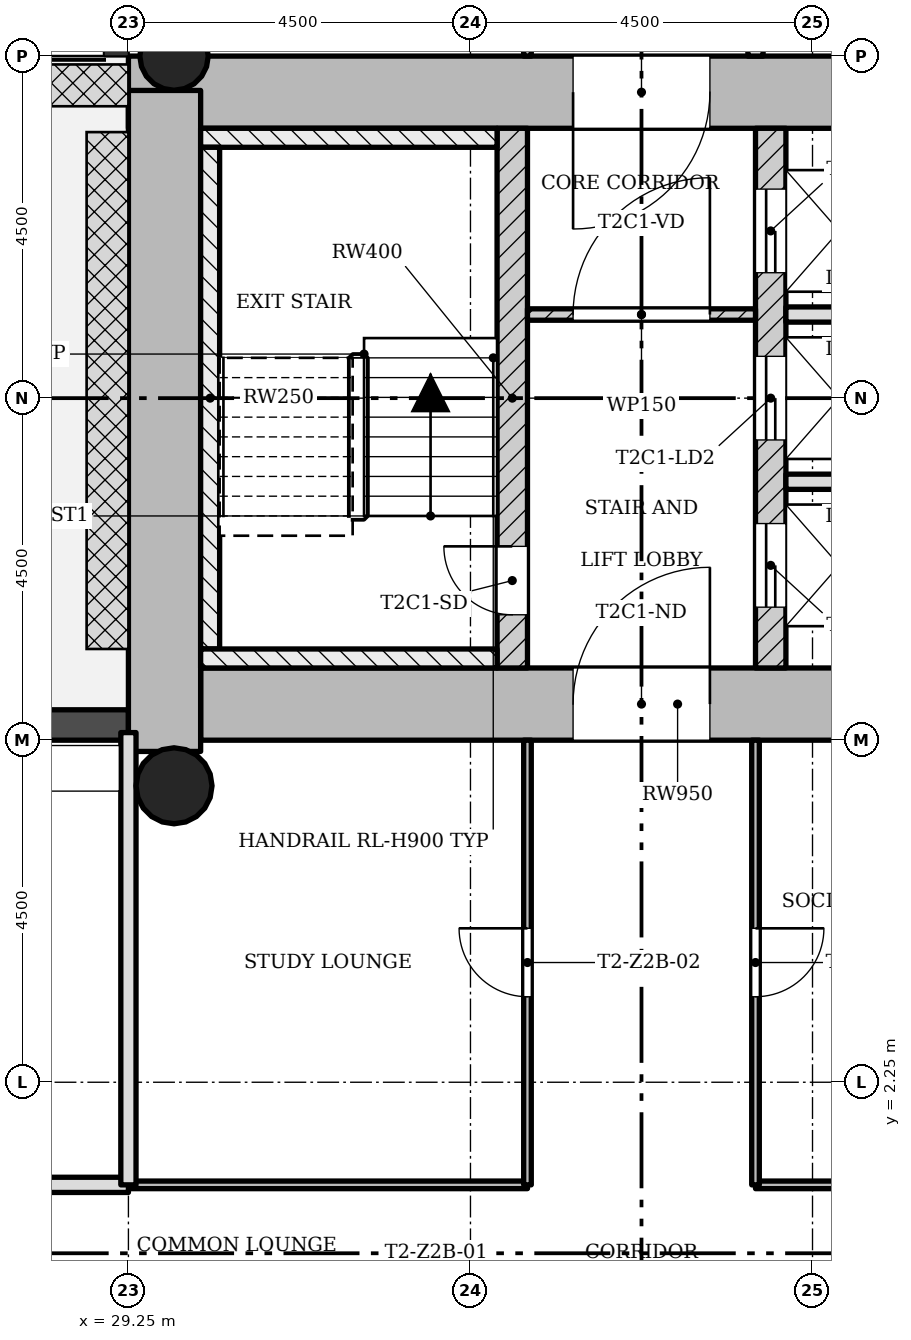
"""IFC4 building model, lengths in metres.
Left out: names, types, materials, properties, quantities, classifications, styles, units other than length and angle.
Written with IfcOpenShell. Run it as: python <this file> out.ifc"""

import sys

from ifc_helpers import new_model, si_unit, direction, frame, frame_2d, origin, origin_2d, place, context, subcontext, project, spatial, rectangle, hollow_circle, extrude, element, fill, save


model = new_model("IFC4")
c1 = context("Model", 3, precision=1e-05, world=origin(), true_north=direction((0.0, 1.0)))
c2 = subcontext(c1, "Body", "Model", "MODEL_VIEW")
j1 = project(units=[si_unit("LENGTHUNIT", "METRE"), si_unit("PLANEANGLEUNIT", "RADIAN")], contexts=[c1])
p1 = place(None, origin())
s1 = spatial("IfcSite", under=j1, at=p1, CompositionType="ELEMENT")
p2 = place(p1, origin())
s2 = spatial("IfcBuilding", under=s1, at=p2, CompositionType="ELEMENT")
p3 = place(p2, frame((0.0, 0.0, 76.6)))
s3 = spatial("IfcBuildingStorey", under=s2, at=p3, CompositionType="ELEMENT", Elevation=76.6)
p4 = place(p3, frame((30.2, 7.225, 0.0), z_axis=(0.0, 0.0, 1.0), x_axis=(1.0, 0.0, 0.0)))
e1 = element("IfcWall", 1, at=p4, inside=s3, PredefinedType="SHEAR", context=c2, shape_type="SweptSolid", body=[
    extrude(rectangle(XDim=12.55, YDim=0.95, at=frame_2d((6.275, 0.0))), origin(), (0.0, 0.0, 1.0), 3.4),
])
p5 = place(p4, frame((4.9, 0.0, 0.0)))
e2 = element("IfcOpeningElement", 2, at=p5, cuts=e1, PredefinedType="OPENING", context=c2, shape_type="SweptSolid", body=[
    extrude(rectangle(XDim=1.8, YDim=2.1, at=frame_2d((0.9, 1.05))), frame((0.0, 0.485, 0.0), z_axis=(0.0, -1.0, 0.0), x_axis=(1.0, 0.0, 0.0)), (0.0, 0.0, 1.0), 0.97),
])
p6 = place(p3, frame((41.8, 15.275, 0.0), z_axis=(0.0, 0.0, 1.0), x_axis=(-1.0, 0.0, 0.0)))
e3 = element("IfcWall", 3, at=p6, inside=s3, PredefinedType="SHEAR", context=c2, shape_type="SweptSolid", body=[
    extrude(rectangle(XDim=12.55, YDim=0.95, at=frame_2d((6.275, 0.0))), origin(), (0.0, 0.0, 1.0), 3.4),
])
p7 = place(p6, frame((4.9, 0.0, 0.0)))
e4 = element("IfcOpeningElement", 4, at=p7, cuts=e3, PredefinedType="OPENING", context=c2, shape_type="SweptSolid", body=[
    extrude(rectangle(XDim=1.8, YDim=2.1, at=frame_2d((0.9, 1.05))), frame((0.0, 0.485, 0.0), z_axis=(0.0, -1.0, 0.0), x_axis=(1.0, 0.0, 0.0)), (0.0, 0.0, 1.0), 0.97),
])
p8 = place(p3, frame((29.725, 15.298, 0.0), z_axis=(0.0, 0.0, 1.0), x_axis=(0.0, -1.0, 0.0)))
e5 = element("IfcWall", 5, at=p8, inside=s3, PredefinedType="SHEAR", context=c2, shape_type="SweptSolid", body=[
    extrude(rectangle(XDim=8.696, YDim=0.95, at=frame_2d((4.348, 0.0))), origin(), (0.0, 0.0, 1.0), 3.4),
])
p9 = place(p3, frame((34.3, 7.7, 0.0), z_axis=(0.0, 0.0, 1.0), x_axis=(0.0, 1.0, 0.0)))
e6 = element("IfcWall", 6, at=p9, inside=s3, PredefinedType="SHEAR", context=c2, shape_type="SweptSolid", body=[
    extrude(rectangle(XDim=7.1, YDim=0.4, at=frame_2d((3.55, 0.0))), origin(), (0.0, 0.0, 1.0), 3.4),
])
p10 = place(p9, frame((0.7, 0.0, 0.0)))
e7 = element("IfcOpeningElement", 7, at=p10, cuts=e6, PredefinedType="OPENING", context=c2, shape_type="SweptSolid", body=[
    extrude(rectangle(XDim=0.9, YDim=2.1, at=frame_2d((0.45, 1.05))), frame((0.0, 0.21, 0.0), z_axis=(0.0, -1.0, 0.0), x_axis=(1.0, 0.0, 0.0)), (0.0, 0.0, 1.0), 0.42),
])
p11 = place(p3, frame((37.7, 7.7, 0.0), z_axis=(0.0, 0.0, 1.0), x_axis=(0.0, 1.0, 0.0)))
e8 = element("IfcWall", 8, at=p11, inside=s3, PredefinedType="SHEAR", context=c2, shape_type="SweptSolid", body=[
    extrude(rectangle(XDim=7.1, YDim=0.4, at=frame_2d((3.55, 0.0))), origin(), (0.0, 0.0, 1.0), 3.4),
])
p12 = place(p11, frame((0.8, 0.0, 0.0)))
e9 = element("IfcOpeningElement", 9, at=p12, cuts=e8, PredefinedType="OPENING", context=c2, shape_type="SweptSolid", body=[
    extrude(rectangle(XDim=1.1, YDim=2.1, at=frame_2d((0.55, 1.05))), frame((0.0, 0.21, 0.0), z_axis=(0.0, -1.0, 0.0), x_axis=(1.0, 0.0, 0.0)), (0.0, 0.0, 1.0), 0.42),
])
p13 = place(p11, frame((3.0, 0.0, 0.0)))
e10 = element("IfcOpeningElement", 10, at=p13, cuts=e8, PredefinedType="OPENING", context=c2, shape_type="SweptSolid", body=[
    extrude(rectangle(XDim=1.1, YDim=2.1, at=frame_2d((0.55, 1.05))), frame((0.0, 0.21, 0.0), z_axis=(0.0, -1.0, 0.0), x_axis=(1.0, 0.0, 0.0)), (0.0, 0.0, 1.0), 0.42),
])
p14 = place(p11, frame((5.2, 0.0, 0.0)))
e11 = element("IfcOpeningElement", 11, at=p14, cuts=e8, PredefinedType="OPENING", context=c2, shape_type="SweptSolid", body=[
    extrude(rectangle(XDim=1.1, YDim=2.1, at=frame_2d((0.55, 1.05))), frame((0.0, 0.21, 0.0), z_axis=(0.0, -1.0, 0.0), x_axis=(1.0, 0.0, 0.0)), (0.0, 0.0, 1.0), 0.42),
])
p15 = place(p3, frame((29.85, 15.75, 0.0), z_axis=(0.0, 0.0, 1.0), x_axis=(1.0, 0.0, 0.0)))
e12 = element("IfcColumn", 12, at=p15, inside=s3, PredefinedType="COLUMN", context=c2, shape_type="SweptSolid", body=[
    extrude(hollow_circle(Radius=0.45, WallThickness=0.032, at=origin_2d()), origin(), (0.0, 0.0, 1.0), 3.4),
])
p16 = place(p3, frame((29.85, 6.15, 0.0), z_axis=(0.0, 0.0, 1.0), x_axis=(1.0, 0.0, 0.0)))
e13 = element("IfcColumn", 13, at=p16, inside=s3, PredefinedType="COLUMN", context=c2, shape_type="SweptSolid", body=[
    extrude(hollow_circle(Radius=0.5, WallThickness=0.036, at=origin_2d()), origin(), (0.0, 0.0, 1.0), 3.4),
])
p17 = place(p3, frame((29.25, 6.95, -0.02), z_axis=(0.0, 0.0, 1.0), x_axis=(-1.0, 0.0, 0.0)))
e14 = element("IfcWall", 14, at=p17, inside=s3, PredefinedType="STANDARD", context=c2, shape_type="SweptSolid", body=[
    extrude(rectangle(XDim=4.5, YDim=0.4, at=frame_2d((2.25, 0.0))), origin(), (0.0, 0.0, 1.0), 3.12),
])
p18 = place(p17, frame((1.35, 0.0, 0.02)))
e15 = element("IfcOpeningElement", 15, at=p18, cuts=e14, PredefinedType="OPENING", context=c2, shape_type="SweptSolid", body=[
    extrude(rectangle(XDim=1.8, YDim=2.1, at=frame_2d((0.9, 1.05))), frame((0.0, 0.21, 0.0), z_axis=(0.0, -1.0, 0.0), x_axis=(1.0, 0.0, 0.0)), (0.0, 0.0, 1.0), 0.42),
])
p19 = place(p3, frame((37.5, 12.35, 0.0), z_axis=(0.0, 0.0, 1.0), x_axis=(-1.0, 0.0, 0.0)))
e16 = element("IfcWall", 16, at=p19, inside=s3, PredefinedType="PARTITIONING", context=c2, shape_type="SweptSolid", body=[
    extrude(rectangle(XDim=3.0, YDim=0.15, at=frame_2d((1.5, 0.0))), origin(), (0.0, 0.0, 1.0), 3.0),
])
p20 = place(p19, frame((0.6, 0.0, 0.0)))
e17 = element("IfcOpeningElement", 17, at=p20, cuts=e16, PredefinedType="OPENING", context=c2, shape_type="SweptSolid", body=[
    extrude(rectangle(XDim=1.8, YDim=2.1, at=frame_2d((0.9, 1.05))), frame((0.0, 0.085, 0.0), z_axis=(0.0, -1.0, 0.0), x_axis=(1.0, 0.0, 0.0)), (0.0, 0.0, 1.0), 0.17),
])
for number, where, z_axis, x_axis in (
    (18, (41.8, 10.15, 0.0), (0.0, 0.0, 1.0), (-1.0, 0.0, 0.0)),
    (19, (41.8, 12.35, 0.0), (0.0, 0.0, 1.0), (-1.0, 0.0, 0.0)),
):
    element("IfcWall", number, at=place(p3, frame(where, z_axis=z_axis, x_axis=x_axis)), inside=s3, PredefinedType="SOLIDWALL", context=c2, shape_type="SweptSolid", body=[
        extrude(rectangle(XDim=3.9, YDim=0.2, at=frame_2d((1.95, 0.0))), origin(), (0.0, 0.0, 1.0), 3.0),
    ])
p21 = place(p3, frame((42.75, 0.9, 0.0), z_axis=(0.0, 0.0, 1.0), x_axis=(-1.0, 0.0, 0.0)))
e20 = element("IfcWall", 20, at=p21, inside=s3, PredefinedType="PARTITIONING", context=c2, shape_type="SweptSolid", body=[
    extrude(rectangle(XDim=5.25, YDim=0.1, at=frame_2d((2.625, 0.0))), origin(), (0.0, 0.0, 1.0), 3.0),
])
p22 = place(p21, frame((0.675, 0.0, 0.0)))
e21 = element("IfcOpeningElement", 21, at=p22, cuts=e20, PredefinedType="OPENING", context=c2, shape_type="SweptSolid", body=[
    extrude(rectangle(XDim=0.9, YDim=2.1, at=frame_2d((0.45, 1.05))), frame((0.0, 0.06, 0.0), z_axis=(0.0, -1.0, 0.0), x_axis=(1.0, 0.0, 0.0)), (0.0, 0.0, 1.0), 0.12),
])
p23 = place(p3, frame((34.5, 0.9, 0.0), z_axis=(0.0, 0.0, 1.0), x_axis=(-1.0, 0.0, 0.0)))
e22 = element("IfcWall", 22, at=p23, inside=s3, PredefinedType="PARTITIONING", context=c2, shape_type="SweptSolid", body=[
    extrude(rectangle(XDim=5.25, YDim=0.1, at=frame_2d((2.625, 0.0))), origin(), (0.0, 0.0, 1.0), 3.0),
])
p24 = place(p3, frame((29.25, 0.9, 0.0), z_axis=(0.0, 0.0, 1.0), x_axis=(-1.0, 0.0, 0.0)))
e23 = element("IfcWall", 23, at=p24, inside=s3, PredefinedType="SOLIDWALL", context=c2, shape_type="SweptSolid", body=[
    extrude(rectangle(XDim=1.8, YDim=0.2, at=frame_2d((0.9, 0.0))), origin(), (0.0, 0.0, 1.0), 3.0),
])
p25 = place(p3, frame((37.5, 0.9, 0.0), z_axis=(0.0, 0.0, 1.0), x_axis=(0.0, 1.0, 0.0)))
e24 = element("IfcWall", 24, at=p25, inside=s3, PredefinedType="PARTITIONING", context=c2, shape_type="SweptSolid", body=[
    extrude(rectangle(XDim=5.85, YDim=0.1, at=frame_2d((2.925, 0.0))), origin(), (0.0, 0.0, 1.0), 3.0),
])
p26 = place(p25, frame((2.475, 0.0, 0.0)))
e25 = element("IfcOpeningElement", 25, at=p26, cuts=e24, PredefinedType="OPENING", context=c2, shape_type="SweptSolid", body=[
    extrude(rectangle(XDim=0.9, YDim=2.1, at=frame_2d((0.45, 1.05))), frame((0.0, 0.06, 0.0), z_axis=(0.0, -1.0, 0.0), x_axis=(1.0, 0.0, 0.0)), (0.0, 0.0, 1.0), 0.12),
])
p27 = place(p3, frame((37.5, 15.75, 0.0), z_axis=(0.0, 0.0, 1.0), x_axis=(0.0, 1.0, 0.0)))
e26 = element("IfcWall", 26, at=p27, inside=s3, PredefinedType="SOLIDWALL", context=c2, shape_type="SweptSolid", body=[
    extrude(rectangle(XDim=4.5, YDim=0.2, at=frame_2d((2.25, 0.0))), origin(), (0.0, 0.0, 1.0), 3.0),
])
p28 = place(p27, frame((3.0, 0.0, 0.0)))
e27 = element("IfcOpeningElement", 27, at=p28, cuts=e26, PredefinedType="OPENING", context=c2, shape_type="SweptSolid", body=[
    extrude(rectangle(XDim=0.9, YDim=2.1, at=frame_2d((0.45, 1.05))), frame((0.0, 0.11, 0.0), z_axis=(0.0, -1.0, 0.0), x_axis=(1.0, 0.0, 0.0)), (0.0, 0.0, 1.0), 0.22),
])
p29 = place(p3, frame((34.5, 0.9, 0.0), z_axis=(0.0, 0.0, 1.0), x_axis=(0.0, 1.0, 0.0)))
e28 = element("IfcWall", 28, at=p29, inside=s3, PredefinedType="PARTITIONING", context=c2, shape_type="SweptSolid", body=[
    extrude(rectangle(XDim=5.85, YDim=0.1, at=frame_2d((2.925, 0.0))), origin(), (0.0, 0.0, 1.0), 3.0),
])
p30 = place(p29, frame((2.475, 0.0, 0.0)))
e29 = element("IfcOpeningElement", 29, at=p30, cuts=e28, PredefinedType="OPENING", context=c2, shape_type="SweptSolid", body=[
    extrude(rectangle(XDim=0.9, YDim=2.1, at=frame_2d((0.45, 1.05))), frame((0.0, 0.06, 0.0), z_axis=(0.0, -1.0, 0.0), x_axis=(1.0, 0.0, 0.0)), (0.0, 0.0, 1.0), 0.12),
])
p31 = place(p3, frame((34.5, 15.75, 0.0), z_axis=(0.0, 0.0, 1.0), x_axis=(0.0, 1.0, 0.0)))
e30 = element("IfcWall", 30, at=p31, inside=s3, PredefinedType="PARTITIONING", context=c2, shape_type="SweptSolid", body=[
    extrude(rectangle(XDim=4.5, YDim=0.1, at=frame_2d((2.25, 0.0))), origin(), (0.0, 0.0, 1.0), 3.0),
])
p32 = place(p31, frame((1.8, 0.0, 0.0)))
e31 = element("IfcOpeningElement", 31, at=p32, cuts=e30, PredefinedType="OPENING", context=c2, shape_type="SweptSolid", body=[
    extrude(rectangle(XDim=0.9, YDim=2.1, at=frame_2d((0.45, 1.05))), frame((0.0, 0.06, 0.0), z_axis=(0.0, -1.0, 0.0), x_axis=(1.0, 0.0, 0.0)), (0.0, 0.0, 1.0), 0.12),
])
p33 = place(p3, frame((29.25, 0.9, 0.0), z_axis=(0.0, 0.0, 1.0), x_axis=(0.0, 1.0, 0.0)))
e32 = element("IfcWall", 32, at=p33, inside=s3, PredefinedType="SOLIDWALL", context=c2, shape_type="SweptSolid", body=[
    extrude(rectangle(XDim=5.95, YDim=0.2, at=frame_2d((2.975, 0.0))), origin(), (0.0, 0.0, 1.0), 3.0),
])
p34 = place(p3, frame((34.1, 14.675, 0.0), z_axis=(0.0, 0.0, 1.0), x_axis=(-1.0, 0.0, 0.0)))
e33 = element("IfcWall", 33, at=p34, inside=s3, PredefinedType="SHEAR", context=c2, shape_type="SweptSolid", body=[
    extrude(rectangle(XDim=3.9, YDim=0.25, at=frame_2d((1.95, 0.0))), origin(), (0.0, 0.0, 1.0), 3.4),
])
p35 = place(p3, frame((30.325, 7.95, 0.0), z_axis=(0.0, 0.0, 1.0), x_axis=(0.0, 1.0, 0.0)))
e34 = element("IfcWall", 34, at=p35, inside=s3, PredefinedType="SHEAR", context=c2, shape_type="SweptSolid", body=[
    extrude(rectangle(XDim=6.6, YDim=0.25, at=frame_2d((3.3, 0.0))), origin(), (0.0, 0.0, 1.0), 3.4),
])
p36 = place(p3, frame((34.1, 7.825, 0.0), z_axis=(0.0, 0.0, 1.0), x_axis=(-1.0, 0.0, 0.0)))
e35 = element("IfcWall", 35, at=p36, inside=s3, PredefinedType="SHEAR", context=c2, shape_type="SweptSolid", body=[
    extrude(rectangle(XDim=3.9, YDim=0.25, at=frame_2d((1.95, 0.0))), origin(), (0.0, 0.0, 1.0), 3.4),
])
p37 = place(p20, origin())
e36 = element("IfcDoor", 36, at=p37, inside=s3, OperationType="SINGLE_SWING_LEFT", PredefinedType="DOOR", context=c2, shape_type="SweptSolid", body=[
    extrude(rectangle(XDim=1.8, YDim=2.1, at=frame_2d((0.9, 1.05))), frame((0.0, 0.025, 0.0), z_axis=(0.0, -1.0, 0.0), x_axis=(1.0, 0.0, 0.0)), (0.0, 0.0, 1.0), 0.05),
])
fill(e17, e36)
p38 = place(p30, origin())
e37 = element("IfcDoor", 37, at=p38, inside=s3, OperationType="SINGLE_SWING_LEFT", PredefinedType="DOOR", context=c2, shape_type="SweptSolid", body=[
    extrude(rectangle(XDim=0.9, YDim=2.1, at=frame_2d((0.45, 1.05))), frame((0.0, 0.025, 0.0), z_axis=(0.0, -1.0, 0.0), x_axis=(1.0, 0.0, 0.0)), (0.0, 0.0, 1.0), 0.05),
])
fill(e29, e37)
p39 = place(p26, origin())
e38 = element("IfcDoor", 38, at=p39, inside=s3, OperationType="SINGLE_SWING_RIGHT", PredefinedType="DOOR", context=c2, shape_type="SweptSolid", body=[
    extrude(rectangle(XDim=0.9, YDim=2.1, at=frame_2d((0.45, 1.05))), frame((0.0, 0.025, 0.0), z_axis=(0.0, -1.0, 0.0), x_axis=(1.0, 0.0, 0.0)), (0.0, 0.0, 1.0), 0.05),
])
fill(e25, e38)
p40 = place(p10, origin())
e39 = element("IfcDoor", 39, at=p40, inside=s3, OperationType="SINGLE_SWING_LEFT", PredefinedType="DOOR", context=c2, shape_type="SweptSolid", body=[
    extrude(rectangle(XDim=0.9, YDim=2.1, at=frame_2d((0.45, 1.05))), frame((0.0, 0.025, 0.0), z_axis=(0.0, -1.0, 0.0), x_axis=(1.0, 0.0, 0.0)), (0.0, 0.0, 1.0), 0.05),
])
fill(e7, e39)
p41 = place(p12, origin())
e40 = element("IfcDoor", 40, at=p41, inside=s3, OperationType="SLIDING_TO_LEFT", PredefinedType="DOOR", context=c2, shape_type="SweptSolid", body=[
    extrude(rectangle(XDim=1.1, YDim=2.1, at=frame_2d((0.55, 1.05))), frame((0.0, 0.025, 0.0), z_axis=(0.0, -1.0, 0.0), x_axis=(1.0, 0.0, 0.0)), (0.0, 0.0, 1.0), 0.05),
])
fill(e9, e40)
p42 = place(p13, origin())
e41 = element("IfcDoor", 41, at=p42, inside=s3, OperationType="SLIDING_TO_LEFT", PredefinedType="DOOR", context=c2, shape_type="SweptSolid", body=[
    extrude(rectangle(XDim=1.1, YDim=2.1, at=frame_2d((0.55, 1.05))), frame((0.0, 0.025, 0.0), z_axis=(0.0, -1.0, 0.0), x_axis=(1.0, 0.0, 0.0)), (0.0, 0.0, 1.0), 0.05),
])
fill(e10, e41)
p43 = place(p14, origin())
e42 = element("IfcDoor", 42, at=p43, inside=s3, OperationType="SLIDING_TO_LEFT", PredefinedType="DOOR", context=c2, shape_type="SweptSolid", body=[
    extrude(rectangle(XDim=1.1, YDim=2.1, at=frame_2d((0.55, 1.05))), frame((0.0, 0.025, 0.0), z_axis=(0.0, -1.0, 0.0), x_axis=(1.0, 0.0, 0.0)), (0.0, 0.0, 1.0), 0.05),
])
fill(e11, e42)
p44 = place(p5, origin())
e43 = element("IfcDoor", 43, at=p44, inside=s3, OperationType="SINGLE_SWING_LEFT", PredefinedType="DOOR", context=c2, shape_type="SweptSolid", body=[
    extrude(rectangle(XDim=1.8, YDim=2.1, at=frame_2d((0.9, 1.05))), frame((0.0, 0.025, 0.0), z_axis=(0.0, -1.0, 0.0), x_axis=(1.0, 0.0, 0.0)), (0.0, 0.0, 1.0), 0.05),
])
fill(e2, e43)
p45 = place(p7, origin())
e44 = element("IfcDoor", 44, at=p45, inside=s3, OperationType="SINGLE_SWING_LEFT", PredefinedType="DOOR", context=c2, shape_type="SweptSolid", body=[
    extrude(rectangle(XDim=1.8, YDim=2.1, at=frame_2d((0.9, 1.05))), frame((0.0, 0.025, 0.0), z_axis=(0.0, -1.0, 0.0), x_axis=(1.0, 0.0, 0.0)), (0.0, 0.0, 1.0), 0.05),
])
fill(e4, e44)
save(model, sys.argv[1])
